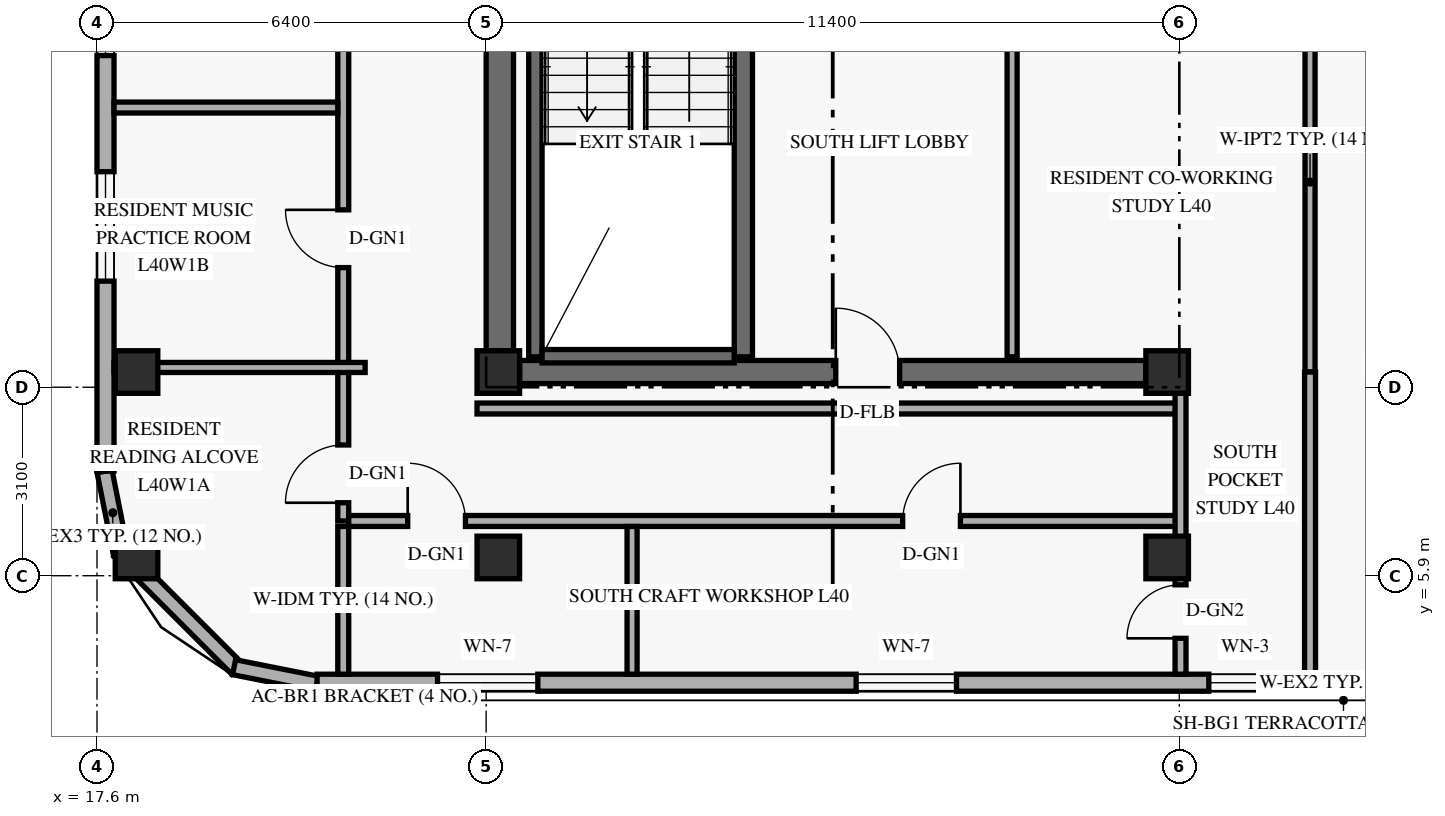
"""IFC4 building model, lengths in metres.
Left out: names, types, materials, properties, quantities, classifications, styles, units other than length and angle.
Written with IfcOpenShell. Run it as: python <this file> out.ifc"""

import sys

from ifc_helpers import new_model, si_unit, direction, frame, frame_2d, origin, origin_2d, place, context, subcontext, project, spatial, rectangle, extrude, element, fill, save


model = new_model("IFC4")
c1 = context("Model", 3, precision=1e-05, world=origin(), true_north=direction((0.0, 1.0)))
c2 = subcontext(c1, "Body", "Model", "MODEL_VIEW")
j1 = project(units=[si_unit("LENGTHUNIT", "METRE"), si_unit("PLANEANGLEUNIT", "RADIAN")], contexts=[c1])
p1 = place(None, origin())
s1 = spatial("IfcSite", under=j1, at=p1, CompositionType="ELEMENT")
p2 = place(p1, origin())
s2 = spatial("IfcBuilding", under=s1, at=p2, CompositionType="ELEMENT")
p3 = place(p2, frame((0.0, 0.0, 155.4)))
s3 = spatial("IfcBuildingStorey", under=s2, at=p3, CompositionType="ELEMENT", Elevation=155.4)
p4 = place(p3, frame((24.225, 9.6, 0.0), z_axis=(0.0, 0.0, 1.0), x_axis=(0.0, 1.0, 0.0)))
e1 = element("IfcWall", 1, at=p4, inside=s3, PredefinedType="SHEAR", context=c2, shape_type="SweptSolid", body=[
    extrude(rectangle(XDim=7.6, YDim=0.45, at=frame_2d((3.8, 0.0))), origin(), (0.0, 0.0, 1.0), 2.748),
])
p5 = place(p3, frame((24.55, 9.25, 0.0), z_axis=(0.0, 0.0, 1.0), x_axis=(1.0, 0.0, 0.0)))
e2 = element("IfcWall", 2, at=p5, inside=s3, PredefinedType="SHEAR", context=c2, shape_type="SweptSolid", body=[
    extrude(rectangle(XDim=10.3, YDim=0.38, at=frame_2d((5.15, 0.0))), origin(), (0.0, 0.0, 1.0), 3.36),
])
p6 = place(p5, frame((5.2, 0.0, 0.0)))
e3 = element("IfcOpeningElement", 3, at=p6, cuts=e2, PredefinedType="OPENING", context=c2, shape_type="SweptSolid", body=[
    extrude(rectangle(XDim=1.05, YDim=2.15, at=frame_2d((0.525, 1.075))), frame((0.0, 0.2, 0.0), z_axis=(0.0, -1.0, 0.0), x_axis=(1.0, 0.0, 0.0)), (0.0, 0.0, 1.0), 0.4),
])
p7 = place(p3, frame((24.81, 9.5, 0.0), z_axis=(0.0, 0.0, 1.0), x_axis=(0.0, 1.0, 0.0)))
e4 = element("IfcWall", 4, at=p7, inside=s3, PredefinedType="SHEAR", context=c2, shape_type="SweptSolid", body=[
    extrude(rectangle(XDim=7.76, YDim=0.22, at=frame_2d((3.88, 0.0))), origin(), (0.0, 0.0, 1.0), 3.36),
])
p8 = place(p3, frame((28.23, 9.5, 0.0), z_axis=(0.0, 0.0, 1.0), x_axis=(0.0, 1.0, 0.0)))
e5 = element("IfcWall", 5, at=p8, inside=s3, PredefinedType="SHEAR", context=c2, shape_type="SweptSolid", body=[
    extrude(rectangle(XDim=7.76, YDim=0.3, at=frame_2d((3.88, 0.0))), origin(), (0.0, 0.0, 1.0), 3.36),
])
p9 = place(p3, frame((24.92, 9.51, 0.0), z_axis=(0.0, 0.0, 1.0), x_axis=(1.0, 0.0, 0.0)))
e6 = element("IfcWall", 6, at=p9, inside=s3, PredefinedType="SHEAR", context=c2, shape_type="SweptSolid", body=[
    extrude(rectangle(XDim=3.16, YDim=0.22, at=frame_2d((1.58, 0.0))), origin(), (0.0, 0.0, 1.0), 3.36),
])
for number, where, z_axis, x_axis in (
    (7, (18.25, 6.2, 0.0), (0.0, 0.0, 1.0), (1.0, 0.0, 0.0)),
    (8, (18.25, 9.25, 0.0), (0.0, 0.0, 1.0), (1.0, 0.0, 0.0)),
    (9, (24.2, 6.2, 0.0), (0.0, 0.0, 1.0), (1.0, 0.0, 0.0)),
    (10, (24.2, 9.25, 0.0), (0.0, 0.0, 1.0), (1.0, 0.0, 0.0)),
    (11, (35.2, 6.2, 0.0), (0.0, 0.0, 1.0), (1.0, 0.0, 0.0)),
    (12, (35.2, 9.25, 0.0), (0.0, 0.0, 1.0), (1.0, 0.0, 0.0)),
):
    element("IfcColumn", number, at=place(p3, frame(where, z_axis=z_axis, x_axis=x_axis)), inside=s3, PredefinedType="COLUMN", context=c2, shape_type="SweptSolid", body=[
        extrude(rectangle(XDim=0.7, YDim=0.7, at=origin_2d()), origin(), (0.0, 0.0, 1.0), 3.6),
    ])
p10 = place(p3, frame((17.724, 7.616, 0.0), z_axis=(0.0, 0.0, 1.0), x_axis=(0.195135625965, -0.9807762678, 0.0)))
e13 = element("IfcWall", 13, at=p10, inside=s3, PredefinedType="SOLIDWALL", context=c2, shape_type="SweptSolid", body=[
    extrude(rectangle(XDim=1.389, YDim=0.25, at=frame_2d((0.694, 0.0))), origin(), (0.0, 0.0, 1.0), 3.36),
])
p11 = place(p3, frame((17.968, 6.305, 0.0), z_axis=(0.0, 0.0, 1.0), x_axis=(0.707106781187, -0.707106781187, 0.0)))
e14 = element("IfcWall", 14, at=p11, inside=s3, PredefinedType="SOLIDWALL", context=c2, shape_type="SweptSolid", body=[
    extrude(rectangle(XDim=2.739, YDim=0.25, at=frame_2d((1.37, 0.0))), origin(), (0.0, 0.0, 1.0), 3.36),
])
p12 = place(p3, frame((19.854, 4.395, 0.0), z_axis=(0.0, 0.0, 1.0), x_axis=(0.980809899341, -0.19496651342, 0.0)))
e15 = element("IfcWall", 15, at=p12, inside=s3, PredefinedType="SOLIDWALL", context=c2, shape_type="SweptSolid", body=[
    extrude(rectangle(XDim=1.389, YDim=0.25, at=frame_2d((0.694, 0.0))), origin(), (0.0, 0.0, 1.0), 3.36),
])
p13 = place(p3, frame((21.22, 4.14, 0.0), z_axis=(0.0, 0.0, 1.0), x_axis=(1.0, 0.0, 0.0)))
e16 = element("IfcWall", 16, at=p13, inside=s3, PredefinedType="SOLIDWALL", context=c2, shape_type="SweptSolid", body=[
    extrude(rectangle(XDim=33.76, YDim=0.28, at=frame_2d((16.88, 0.0))), origin(), (0.0, 0.0, 1.0), 3.36),
])
p14 = place(p13, frame((1.98, 0.0, 0.85)))
e17 = element("IfcOpeningElement", 17, at=p14, cuts=e16, PredefinedType="OPENING", context=c2, shape_type="SweptSolid", body=[
    extrude(rectangle(XDim=1.65, YDim=1.6, at=frame_2d((0.825, 0.8))), frame((0.0, 0.15, 0.0), z_axis=(0.0, -1.0, 0.0), x_axis=(1.0, 0.0, 0.0)), (0.0, 0.0, 1.0), 0.3),
])
p15 = place(p13, frame((8.865, 0.0, 0.85)))
e18 = element("IfcOpeningElement", 18, at=p15, cuts=e16, PredefinedType="OPENING", context=c2, shape_type="SweptSolid", body=[
    extrude(rectangle(XDim=1.65, YDim=1.6, at=frame_2d((0.825, 0.8))), frame((0.0, 0.15, 0.0), z_axis=(0.0, -1.0, 0.0), x_axis=(1.0, 0.0, 0.0)), (0.0, 0.0, 1.0), 0.3),
])
p16 = place(p13, frame((14.665, 0.0, 0.85)))
e19 = element("IfcOpeningElement", 19, at=p16, cuts=e16, PredefinedType="OPENING", context=c2, shape_type="SweptSolid", body=[
    extrude(rectangle(XDim=1.2, YDim=1.5, at=frame_2d((0.6, 0.75))), frame((0.0, 0.15, 0.0), z_axis=(0.0, -1.0, 0.0), x_axis=(1.0, 0.0, 0.0)), (0.0, 0.0, 1.0), 0.3),
])
p17 = place(p13, frame((18.485, 0.0, 0.85)))
e20 = element("IfcOpeningElement", 20, at=p17, cuts=e16, PredefinedType="OPENING", context=c2, shape_type="SweptSolid", body=[
    extrude(rectangle(XDim=1.65, YDim=1.6, at=frame_2d((0.825, 0.8))), frame((0.0, 0.15, 0.0), z_axis=(0.0, -1.0, 0.0), x_axis=(1.0, 0.0, 0.0)), (0.0, 0.0, 1.0), 0.3),
])
p18 = place(p13, frame((24.61, 0.0, 0.85)))
e21 = element("IfcOpeningElement", 21, at=p18, cuts=e16, PredefinedType="OPENING", context=c2, shape_type="SweptSolid", body=[
    extrude(rectangle(XDim=1.65, YDim=1.6, at=frame_2d((0.825, 0.8))), frame((0.0, 0.15, 0.0), z_axis=(0.0, -1.0, 0.0), x_axis=(1.0, 0.0, 0.0)), (0.0, 0.0, 1.0), 0.3),
])
p19 = place(p13, frame((30.345, 0.0, 0.85)))
e22 = element("IfcOpeningElement", 22, at=p19, cuts=e16, PredefinedType="OPENING", context=c2, shape_type="SweptSolid", body=[
    extrude(rectangle(XDim=1.65, YDim=1.6, at=frame_2d((0.825, 0.8))), frame((0.0, 0.15, 0.0), z_axis=(0.0, -1.0, 0.0), x_axis=(1.0, 0.0, 0.0)), (0.0, 0.0, 1.0), 0.3),
])
p20 = place(p3, frame((17.74, 40.38, 0.0), z_axis=(0.0, 0.0, 1.0), x_axis=(0.0, -1.0, 0.0)))
e23 = element("IfcWall", 23, at=p20, inside=s3, PredefinedType="SOLIDWALL", context=c2, shape_type="SweptSolid", body=[
    extrude(rectangle(XDim=32.76, YDim=0.28, at=frame_2d((16.38, 0.0))), origin(), (0.0, 0.0, 1.0), 3.36),
])
p21 = place(p20, frame((27.835, 0.0, 0.85)))
e24 = element("IfcOpeningElement", 24, at=p21, cuts=e23, PredefinedType="OPENING", context=c2, shape_type="SweptSolid", body=[
    extrude(rectangle(XDim=1.8, YDim=1.6, at=frame_2d((0.9, 0.8))), frame((0.0, 0.15, 0.0), z_axis=(0.0, -1.0, 0.0), x_axis=(1.0, 0.0, 0.0)), (0.0, 0.0, 1.0), 0.3),
])
p22 = place(p20, frame((24.125, 0.0, 0.85)))
e25 = element("IfcOpeningElement", 25, at=p22, cuts=e23, PredefinedType="OPENING", context=c2, shape_type="SweptSolid", body=[
    extrude(rectangle(XDim=1.8, YDim=1.6, at=frame_2d((0.9, 0.8))), frame((0.0, 0.15, 0.0), z_axis=(0.0, -1.0, 0.0), x_axis=(1.0, 0.0, 0.0)), (0.0, 0.0, 1.0), 0.3),
])
p23 = place(p20, frame((18.305, 0.0, 0.85)))
e26 = element("IfcOpeningElement", 26, at=p23, cuts=e23, PredefinedType="OPENING", context=c2, shape_type="SweptSolid", body=[
    extrude(rectangle(XDim=1.8, YDim=1.6, at=frame_2d((0.9, 0.8))), frame((0.0, 0.15, 0.0), z_axis=(0.0, -1.0, 0.0), x_axis=(1.0, 0.0, 0.0)), (0.0, 0.0, 1.0), 0.3),
])
p24 = place(p20, frame((12.88, 0.0, 0.85)))
e27 = element("IfcOpeningElement", 27, at=p24, cuts=e23, PredefinedType="OPENING", context=c2, shape_type="SweptSolid", body=[
    extrude(rectangle(XDim=1.8, YDim=1.6, at=frame_2d((0.9, 0.8))), frame((0.0, 0.15, 0.0), z_axis=(0.0, -1.0, 0.0), x_axis=(1.0, 0.0, 0.0)), (0.0, 0.0, 1.0), 0.3),
])
p25 = place(p20, frame((6.96, 0.0, 0.85)))
e28 = element("IfcOpeningElement", 28, at=p25, cuts=e23, PredefinedType="OPENING", context=c2, shape_type="SweptSolid", body=[
    extrude(rectangle(XDim=1.8, YDim=1.6, at=frame_2d((0.9, 0.8))), frame((0.0, 0.15, 0.0), z_axis=(0.0, -1.0, 0.0), x_axis=(1.0, 0.0, 0.0)), (0.0, 0.0, 1.0), 0.3),
])
p26 = place(p20, frame((3.125, 0.0, 0.85)))
e29 = element("IfcOpeningElement", 29, at=p26, cuts=e23, PredefinedType="OPENING", context=c2, shape_type="SweptSolid", body=[
    extrude(rectangle(XDim=1.8, YDim=1.6, at=frame_2d((0.9, 0.8))), frame((0.0, 0.15, 0.0), z_axis=(0.0, -1.0, 0.0), x_axis=(1.0, 0.0, 0.0)), (0.0, 0.0, 1.0), 0.3),
])
p27 = place(p3, frame((32.65, 9.5, 0.0), z_axis=(0.0, 0.0, 1.0), x_axis=(0.0, 1.0, 0.0)))
e30 = element("IfcWall", 30, at=p27, inside=s3, PredefinedType="PARTITIONING", context=c2, shape_type="SweptSolid", body=[
    extrude(rectangle(XDim=6.08, YDim=0.165, at=frame_2d((3.04, 0.0))), origin(), (0.0, 0.0, 1.0), 3.36),
])
p28 = place(p3, frame((37.55, 9.25, 0.0), z_axis=(0.0, 0.0, 1.0), x_axis=(0.0, 1.0, 0.0)))
e31 = element("IfcWall", 31, at=p28, inside=s3, PredefinedType="PARTITIONING", context=c2, shape_type="SweptSolid", body=[
    extrude(rectangle(XDim=6.248, YDim=0.165, at=frame_2d((3.124, 0.0))), origin(), (0.0, 0.0, 1.0), 2.73),
])
p29 = place(p3, frame((21.65, 6.8, 0.0), z_axis=(0.0, 0.0, 1.0), x_axis=(0.0, 1.0, 0.0)))
e32 = element("IfcWall", 32, at=p29, inside=s3, PredefinedType="STANDARD", context=c2, shape_type="SweptSolid", body=[
    extrude(rectangle(XDim=34.4, YDim=0.18, at=frame_2d((17.2, 0.0))), origin(), (0.0, 0.0, 1.0), 2.73),
])
p30 = place(p29, frame((0.3, 0.0, 0.0)))
e33 = element("IfcOpeningElement", 33, at=p30, cuts=e32, PredefinedType="OPENING", context=c2, shape_type="SweptSolid", body=[
    extrude(rectangle(XDim=0.95, YDim=2.15, at=frame_2d((0.475, 1.075))), frame((0.0, 0.1, 0.0), z_axis=(0.0, -1.0, 0.0), x_axis=(1.0, 0.0, 0.0)), (0.0, 0.0, 1.0), 0.2),
])
p31 = place(p29, frame((4.167, 0.0, 0.0)))
e34 = element("IfcOpeningElement", 34, at=p31, cuts=e32, PredefinedType="OPENING", context=c2, shape_type="SweptSolid", body=[
    extrude(rectangle(XDim=0.95, YDim=2.15, at=frame_2d((0.475, 1.075))), frame((0.0, 0.1, 0.0), z_axis=(0.0, -1.0, 0.0), x_axis=(1.0, 0.0, 0.0)), (0.0, 0.0, 1.0), 0.2),
])
p32 = place(p29, frame((8.77, 0.0, 0.0)))
e35 = element("IfcOpeningElement", 35, at=p32, cuts=e32, PredefinedType="OPENING", context=c2, shape_type="SweptSolid", body=[
    extrude(rectangle(XDim=0.95, YDim=2.15, at=frame_2d((0.475, 1.075))), frame((0.0, 0.1, 0.0), z_axis=(0.0, -1.0, 0.0), x_axis=(1.0, 0.0, 0.0)), (0.0, 0.0, 1.0), 0.2),
])
p33 = place(p29, frame((13.88, 0.0, 0.0)))
e36 = element("IfcOpeningElement", 36, at=p33, cuts=e32, PredefinedType="OPENING", context=c2, shape_type="SweptSolid", body=[
    extrude(rectangle(XDim=0.95, YDim=2.15, at=frame_2d((0.475, 1.075))), frame((0.0, 0.1, 0.0), z_axis=(0.0, -1.0, 0.0), x_axis=(1.0, 0.0, 0.0)), (0.0, 0.0, 1.0), 0.2),
])
p34 = place(p29, frame((19.395, 0.0, 0.0)))
e37 = element("IfcOpeningElement", 37, at=p34, cuts=e32, PredefinedType="OPENING", context=c2, shape_type="SweptSolid", body=[
    extrude(rectangle(XDim=0.95, YDim=2.15, at=frame_2d((0.475, 1.075))), frame((0.0, 0.1, 0.0), z_axis=(0.0, -1.0, 0.0), x_axis=(1.0, 0.0, 0.0)), (0.0, 0.0, 1.0), 0.2),
])
p35 = place(p29, frame((24.505, 0.0, 0.0)))
e38 = element("IfcOpeningElement", 38, at=p35, cuts=e32, PredefinedType="OPENING", context=c2, shape_type="SweptSolid", body=[
    extrude(rectangle(XDim=0.95, YDim=2.15, at=frame_2d((0.475, 1.075))), frame((0.0, 0.1, 0.0), z_axis=(0.0, -1.0, 0.0), x_axis=(1.0, 0.0, 0.0)), (0.0, 0.0, 1.0), 0.2),
])
p36 = place(p29, frame((29.782, 0.0, 0.0)))
e39 = element("IfcOpeningElement", 39, at=p36, cuts=e32, PredefinedType="OPENING", context=c2, shape_type="SweptSolid", body=[
    extrude(rectangle(XDim=0.95, YDim=2.15, at=frame_2d((0.475, 1.075))), frame((0.0, 0.1, 0.0), z_axis=(0.0, -1.0, 0.0), x_axis=(1.0, 0.0, 0.0)), (0.0, 0.0, 1.0), 0.2),
])
p37 = place(p29, frame((33.19, 0.0, 0.0)))
e40 = element("IfcOpeningElement", 40, at=p37, cuts=e32, PredefinedType="OPENING", context=c2, shape_type="SweptSolid", body=[
    extrude(rectangle(XDim=0.95, YDim=2.15, at=frame_2d((0.475, 1.075))), frame((0.0, 0.1, 0.0), z_axis=(0.0, -1.0, 0.0), x_axis=(1.0, 0.0, 0.0)), (0.0, 0.0, 1.0), 0.2),
])
p38 = place(p3, frame((21.74, 6.8, 0.0), z_axis=(0.0, 0.0, 1.0), x_axis=(1.0, 0.0, 0.0)))
e41 = element("IfcWall", 41, at=p38, inside=s3, PredefinedType="STANDARD", context=c2, shape_type="SweptSolid", body=[
    extrude(rectangle(XDim=13.68, YDim=0.18, at=frame_2d((6.84, 0.0))), origin(), (0.0, 0.0, 1.0), 2.73),
])
p39 = place(p38, frame((0.97, 0.0, 0.0)))
e42 = element("IfcOpeningElement", 42, at=p39, cuts=e41, PredefinedType="OPENING", context=c2, shape_type="SweptSolid", body=[
    extrude(rectangle(XDim=0.95, YDim=2.15, at=frame_2d((0.475, 1.075))), frame((0.0, 0.1, 0.0), z_axis=(0.0, -1.0, 0.0), x_axis=(1.0, 0.0, 0.0)), (0.0, 0.0, 1.0), 0.2),
])
p40 = place(p38, frame((9.11, 0.0, 0.0)))
e43 = element("IfcOpeningElement", 43, at=p40, cuts=e41, PredefinedType="OPENING", context=c2, shape_type="SweptSolid", body=[
    extrude(rectangle(XDim=0.95, YDim=2.15, at=frame_2d((0.475, 1.075))), frame((0.0, 0.1, 0.0), z_axis=(0.0, -1.0, 0.0), x_axis=(1.0, 0.0, 0.0)), (0.0, 0.0, 1.0), 0.2),
])
p41 = place(p3, frame((23.85, 8.65, 0.0), z_axis=(0.0, 0.0, 1.0), x_axis=(1.0, 0.0, 0.0)))
e44 = element("IfcWall", 44, at=p41, inside=s3, PredefinedType="STANDARD", context=c2, shape_type="SweptSolid", body=[
    extrude(rectangle(XDim=11.57, YDim=0.18, at=frame_2d((5.785, 0.0))), origin(), (0.0, 0.0, 1.0), 2.73),
])
p42 = place(p3, frame((21.65, 4.28, 0.0), z_axis=(0.0, 0.0, 1.0), x_axis=(0.0, 1.0, 0.0)))
e45 = element("IfcWall", 45, at=p42, inside=s3, PredefinedType="PARTITIONING", context=c2, shape_type="SweptSolid", body=[
    extrude(rectangle(XDim=2.43, YDim=0.18, at=frame_2d((1.215, 0.0))), origin(), (0.0, 0.0, 1.0), 2.879),
])
p43 = place(p3, frame((35.42, 4.28, 0.0), z_axis=(0.0, 0.0, 1.0), x_axis=(0.0, 1.0, 0.0)))
e46 = element("IfcWall", 46, at=p43, inside=s3, PredefinedType="PARTITIONING", context=c2, shape_type="SweptSolid", body=[
    extrude(rectangle(XDim=4.97, YDim=0.18, at=frame_2d((2.485, 0.0))), origin(), (0.0, 0.0, 1.0), 2.73),
])
p44 = place(p43, frame((0.59, 0.0, 0.0)))
e47 = element("IfcOpeningElement", 47, at=p44, cuts=e46, PredefinedType="OPENING", context=c2, shape_type="SweptSolid", body=[
    extrude(rectangle(XDim=0.88, YDim=2.12, at=frame_2d((0.44, 1.06))), frame((0.0, 0.1, 0.0), z_axis=(0.0, -1.0, 0.0), x_axis=(1.0, 0.0, 0.0)), (0.0, 0.0, 1.0), 0.2),
])
p45 = place(p3, frame((37.55, 4.28, 0.0), z_axis=(0.0, 0.0, 1.0), x_axis=(0.0, 1.0, 0.0)))
e48 = element("IfcWall", 48, at=p45, inside=s3, PredefinedType="PARTITIONING", context=c2, shape_type="SweptSolid", body=[
    extrude(rectangle(XDim=4.97, YDim=0.18, at=frame_2d((2.485, 0.0))), origin(), (0.0, 0.0, 1.0), 2.73),
])
p46 = place(p3, frame((17.88, 9.325, 0.0), z_axis=(0.0, 0.0, 1.0), x_axis=(1.0, 0.0, 0.0)))
e49 = element("IfcWall", 49, at=p46, inside=s3, PredefinedType="PARTITIONING", context=c2, shape_type="SweptSolid", body=[
    extrude(rectangle(XDim=4.13, YDim=0.165, at=frame_2d((2.065, 0.0))), origin(), (0.0, 0.0, 1.0), 2.73),
])
p47 = place(p3, frame((17.88, 13.6, 0.0), z_axis=(0.0, 0.0, 1.0), x_axis=(1.0, 0.0, 0.0)))
e50 = element("IfcWall", 50, at=p47, inside=s3, PredefinedType="PARTITIONING", context=c2, shape_type="SweptSolid", body=[
    extrude(rectangle(XDim=3.68, YDim=0.18, at=frame_2d((1.84, 0.0))), origin(), (0.0, 0.0, 1.0), 2.879),
])
p48 = place(p3, frame((26.4, 4.28, 0.0), z_axis=(0.0, 0.0, 1.0), x_axis=(0.0, 1.0, 0.0)))
e51 = element("IfcWall", 51, at=p48, inside=s3, PredefinedType="PARTITIONING", context=c2, shape_type="SweptSolid", body=[
    extrude(rectangle(XDim=2.43, YDim=0.165, at=frame_2d((1.215, 0.0))), origin(), (0.0, 0.0, 1.0), 2.879),
])
p49 = place(p14, origin())
e52 = element("IfcWindow", 52, at=p49, inside=s3, PartitioningType="SINGLE_PANEL", PredefinedType="WINDOW", context=c2, shape_type="SweptSolid", body=[
    extrude(rectangle(XDim=1.65, YDim=1.6, at=frame_2d((0.825, 0.8))), frame((0.0, 0.03, 0.0), z_axis=(0.0, -1.0, 0.0), x_axis=(1.0, 0.0, 0.0)), (0.0, 0.0, 1.0), 0.06),
])
fill(e17, e52)
p50 = place(p15, origin())
e53 = element("IfcWindow", 53, at=p50, inside=s3, PartitioningType="SINGLE_PANEL", PredefinedType="WINDOW", context=c2, shape_type="SweptSolid", body=[
    extrude(rectangle(XDim=1.65, YDim=1.6, at=frame_2d((0.825, 0.8))), frame((0.0, 0.03, 0.0), z_axis=(0.0, -1.0, 0.0), x_axis=(1.0, 0.0, 0.0)), (0.0, 0.0, 1.0), 0.06),
])
fill(e18, e53)
p51 = place(p16, origin())
e54 = element("IfcWindow", 54, at=p51, inside=s3, PartitioningType="SINGLE_PANEL", PredefinedType="WINDOW", context=c2, shape_type="SweptSolid", body=[
    extrude(rectangle(XDim=1.2, YDim=1.5, at=frame_2d((0.6, 0.75))), frame((0.0, 0.03, 0.0), z_axis=(0.0, -1.0, 0.0), x_axis=(1.0, 0.0, 0.0)), (0.0, 0.0, 1.0), 0.06),
])
fill(e19, e54)
p52 = place(p21, origin())
e55 = element("IfcWindow", 55, at=p52, inside=s3, PartitioningType="SINGLE_PANEL", PredefinedType="WINDOW", context=c2, shape_type="SweptSolid", body=[
    extrude(rectangle(XDim=1.8, YDim=1.6, at=frame_2d((0.9, 0.8))), frame((0.0, 0.03, 0.0), z_axis=(0.0, -1.0, 0.0), x_axis=(1.0, 0.0, 0.0)), (0.0, 0.0, 1.0), 0.06),
])
fill(e24, e55)
p53 = place(p22, origin())
e56 = element("IfcWindow", 56, at=p53, inside=s3, PartitioningType="SINGLE_PANEL", PredefinedType="WINDOW", context=c2, shape_type="SweptSolid", body=[
    extrude(rectangle(XDim=1.8, YDim=1.6, at=frame_2d((0.9, 0.8))), frame((0.0, 0.03, 0.0), z_axis=(0.0, -1.0, 0.0), x_axis=(1.0, 0.0, 0.0)), (0.0, 0.0, 1.0), 0.06),
])
fill(e25, e56)
p54 = place(p6, origin())
e57 = element("IfcDoor", 57, at=p54, inside=s3, OperationType="SINGLE_SWING_LEFT", PredefinedType="DOOR", context=c2, shape_type="SweptSolid", body=[
    extrude(rectangle(XDim=1.05, YDim=2.15, at=frame_2d((0.525, 1.075))), frame((0.0, 0.025, 0.0), z_axis=(0.0, -1.0, 0.0), x_axis=(1.0, 0.0, 0.0)), (0.0, 0.0, 1.0), 0.05),
])
fill(e3, e57)
p55 = place(p44, origin())
e58 = element("IfcDoor", 58, at=p55, inside=s3, OperationType="SINGLE_SWING_LEFT", PredefinedType="DOOR", context=c2, shape_type="SweptSolid", body=[
    extrude(rectangle(XDim=0.88, YDim=2.12, at=frame_2d((0.44, 1.06))), frame((0.0, 0.025, 0.0), z_axis=(0.0, -1.0, 0.0), x_axis=(1.0, 0.0, 0.0)), (0.0, 0.0, 1.0), 0.05),
])
fill(e47, e58)
p56 = place(p30, origin())
e59 = element("IfcDoor", 59, at=p56, inside=s3, OperationType="SINGLE_SWING_LEFT", PredefinedType="DOOR", context=c2, shape_type="SweptSolid", body=[
    extrude(rectangle(XDim=0.95, YDim=2.15, at=frame_2d((0.475, 1.075))), frame((0.0, 0.025, 0.0), z_axis=(0.0, -1.0, 0.0), x_axis=(1.0, 0.0, 0.0)), (0.0, 0.0, 1.0), 0.05),
])
fill(e33, e59)
p57 = place(p31, origin())
e60 = element("IfcDoor", 60, at=p57, inside=s3, OperationType="SINGLE_SWING_RIGHT", PredefinedType="DOOR", context=c2, shape_type="SweptSolid", body=[
    extrude(rectangle(XDim=0.95, YDim=2.15, at=frame_2d((0.475, 1.075))), frame((0.0, 0.025, 0.0), z_axis=(0.0, -1.0, 0.0), x_axis=(1.0, 0.0, 0.0)), (0.0, 0.0, 1.0), 0.05),
])
fill(e34, e60)
p58 = place(p39, origin())
e61 = element("IfcDoor", 61, at=p58, inside=s3, OperationType="SINGLE_SWING_LEFT", PredefinedType="DOOR", context=c2, shape_type="SweptSolid", body=[
    extrude(rectangle(XDim=0.95, YDim=2.15, at=frame_2d((0.475, 1.075))), frame((0.0, 0.025, 0.0), z_axis=(0.0, -1.0, 0.0), x_axis=(1.0, 0.0, 0.0)), (0.0, 0.0, 1.0), 0.05),
])
fill(e42, e61)
p59 = place(p40, origin())
e62 = element("IfcDoor", 62, at=p59, inside=s3, OperationType="SINGLE_SWING_RIGHT", PredefinedType="DOOR", context=c2, shape_type="SweptSolid", body=[
    extrude(rectangle(XDim=0.95, YDim=2.15, at=frame_2d((0.475, 1.075))), frame((0.0, 0.025, 0.0), z_axis=(0.0, -1.0, 0.0), x_axis=(1.0, 0.0, 0.0)), (0.0, 0.0, 1.0), 0.05),
])
fill(e43, e62)
save(model, sys.argv[1])
